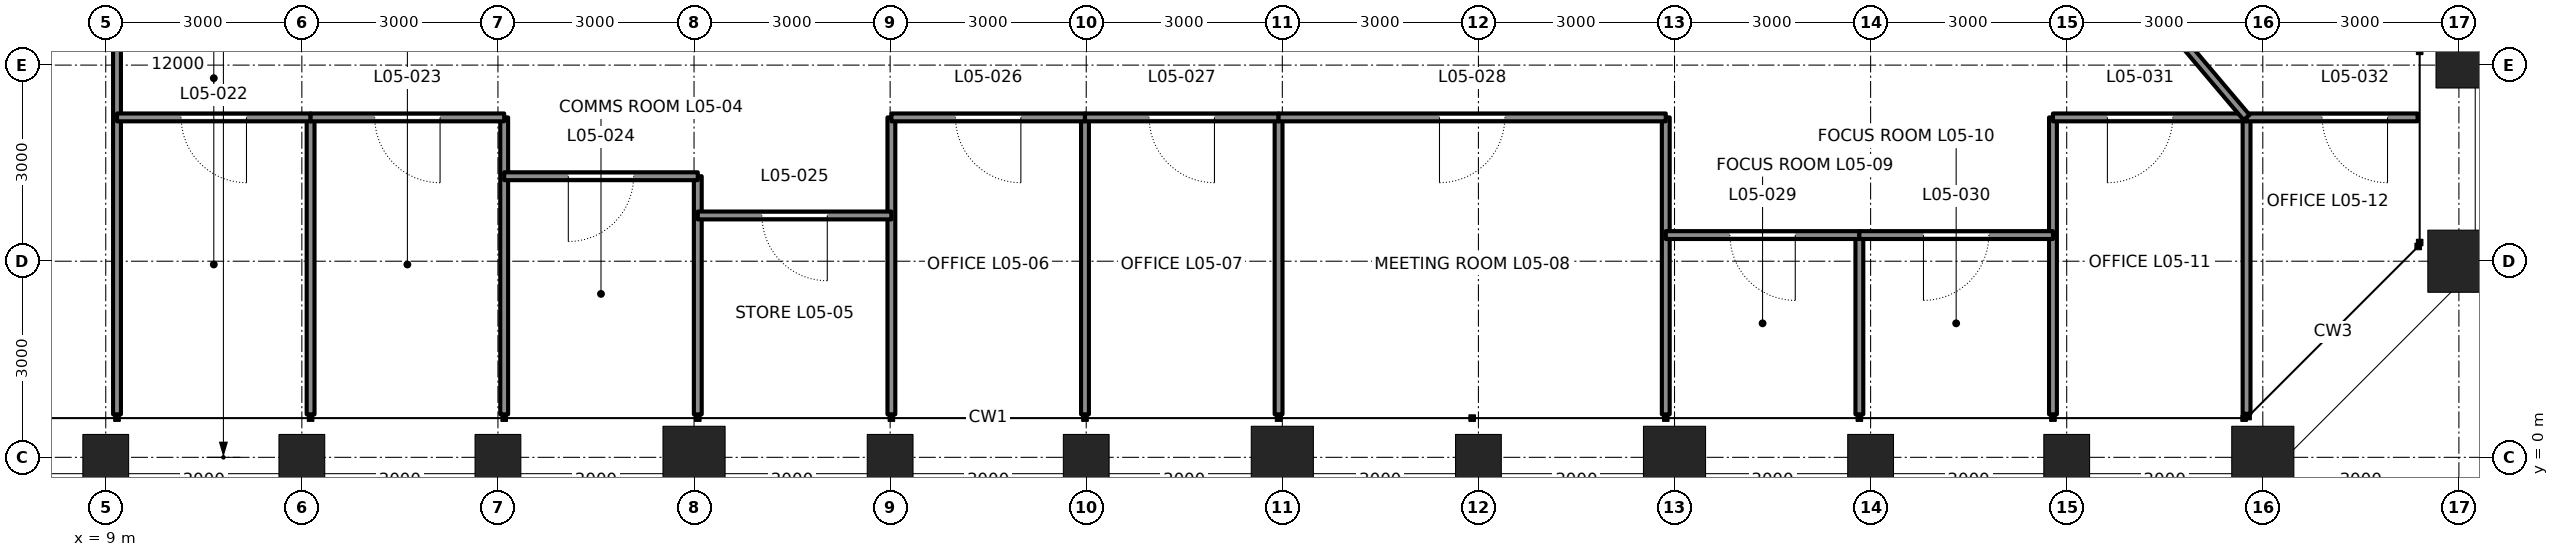
"""IFC4 building model, lengths in metres.
Left out: names, types, materials, properties, quantities, classifications, styles, units other than length and angle.
Written with IfcOpenShell. Run it as: python <this file> out.ifc"""

import sys

from ifc_helpers import new_model, si_unit, direction, frame, frame_2d, origin, origin_2d, place, context, subcontext, project, spatial, rectangle, hollow_rectangle, extrude, element, fill, save


model = new_model("IFC4")
c1 = context("Model", 3, precision=1e-05, world=origin(), true_north=direction((0.0, 1.0)))
c2 = subcontext(c1, "Body", "Model", "MODEL_VIEW")
j1 = project(units=[si_unit("LENGTHUNIT", "METRE"), si_unit("PLANEANGLEUNIT", "RADIAN")], contexts=[c1])
p1 = place(None, origin())
s1 = spatial("IfcSite", under=j1, at=p1, CompositionType="ELEMENT")
p2 = place(p1, origin())
s2 = spatial("IfcBuilding", under=s1, at=p2, CompositionType="ELEMENT")
p3 = place(p2, frame((0.0, 0.0, 28.8)))
s3 = spatial("IfcBuildingStorey", under=s2, at=p3, CompositionType="ELEMENT", Elevation=28.8)
for number, where, z_axis, x_axis in (
    (1, (9.0, 0.0, 0.0), (0.0, 0.0, 1.0), (0.0, -1.0, 0.0)),
    (2, (12.0, 0.0, 0.0), (0.0, 0.0, 1.0), (0.0, -1.0, 0.0)),
    (3, (15.0, 0.0, 0.0), (0.0, 0.0, 1.0), (0.0, -1.0, 0.0)),
):
    element("IfcColumn", number, at=place(p3, frame(where, z_axis=z_axis, x_axis=x_axis)), inside=s3, PredefinedType="COLUMN", context=c2, shape_type="SweptSolid", body=[
        extrude(hollow_rectangle(XDim=0.7, YDim=0.7, WallThickness=0.07, at=origin_2d()), origin(), (0.0, 0.0, 1.0), 4.5),
    ])
p4 = place(p3, frame((18.0, 0.0, 0.0), z_axis=(0.0, 0.0, 1.0), x_axis=(0.0, -1.0, 0.0)))
e4 = element("IfcColumn", 4, at=p4, inside=s3, PredefinedType="COLUMN", context=c2, shape_type="SweptSolid", body=[
    extrude(hollow_rectangle(XDim=0.95, YDim=0.95, WallThickness=0.11, at=origin_2d()), origin(), (0.0, 0.0, 1.0), 4.5),
])
for number, where, z_axis, x_axis in (
    (5, (21.0, 0.0, 0.0), (0.0, 0.0, 1.0), (0.0, -1.0, 0.0)),
    (6, (24.0, 0.0, 0.0), (0.0, 0.0, 1.0), (0.0, -1.0, 0.0)),
):
    element("IfcColumn", number, at=place(p3, frame(where, z_axis=z_axis, x_axis=x_axis)), inside=s3, PredefinedType="COLUMN", context=c2, shape_type="SweptSolid", body=[
        extrude(hollow_rectangle(XDim=0.7, YDim=0.7, WallThickness=0.07, at=origin_2d()), origin(), (0.0, 0.0, 1.0), 4.5),
    ])
p5 = place(p3, frame((27.0, 0.0, 0.0), z_axis=(0.0, 0.0, 1.0), x_axis=(0.0, -1.0, 0.0)))
e7 = element("IfcColumn", 7, at=p5, inside=s3, PredefinedType="COLUMN", context=c2, shape_type="SweptSolid", body=[
    extrude(hollow_rectangle(XDim=0.95, YDim=0.95, WallThickness=0.11, at=origin_2d()), origin(), (0.0, 0.0, 1.0), 4.5),
])
p6 = place(p3, frame((30.0, 0.0, 0.0), z_axis=(0.0, 0.0, 1.0), x_axis=(0.0, -1.0, 0.0)))
e8 = element("IfcColumn", 8, at=p6, inside=s3, PredefinedType="COLUMN", context=c2, shape_type="SweptSolid", body=[
    extrude(hollow_rectangle(XDim=0.7, YDim=0.7, WallThickness=0.07, at=origin_2d()), origin(), (0.0, 0.0, 1.0), 4.5),
])
p7 = place(p3, frame((33.0, 0.0, 0.0), z_axis=(0.0, 0.0, 1.0), x_axis=(0.0, -1.0, 0.0)))
e9 = element("IfcColumn", 9, at=p7, inside=s3, PredefinedType="COLUMN", context=c2, shape_type="SweptSolid", body=[
    extrude(hollow_rectangle(XDim=0.95, YDim=0.95, WallThickness=0.11, at=origin_2d()), origin(), (0.0, 0.0, 1.0), 4.5),
])
for number, where, z_axis, x_axis in (
    (10, (36.0, 0.0, 0.0), (0.0, 0.0, 1.0), (0.0, -1.0, 0.0)),
    (11, (39.0, 0.0, 0.0), (0.0, 0.0, 1.0), (0.0, -1.0, 0.0)),
):
    element("IfcColumn", number, at=place(p3, frame(where, z_axis=z_axis, x_axis=x_axis)), inside=s3, PredefinedType="COLUMN", context=c2, shape_type="SweptSolid", body=[
        extrude(hollow_rectangle(XDim=0.7, YDim=0.7, WallThickness=0.07, at=origin_2d()), origin(), (0.0, 0.0, 1.0), 4.5),
    ])
for number, where, z_axis, x_axis in (
    (12, (42.0, 0.0, 0.0), (0.0, 0.0, 1.0), (0.0, -1.0, 0.0)),
    (13, (45.0, 3.0, 0.0), (0.0, 0.0, 1.0), (1.0, 0.0, 0.0)),
):
    element("IfcColumn", number, at=place(p3, frame(where, z_axis=z_axis, x_axis=x_axis)), inside=s3, PredefinedType="COLUMN", context=c2, shape_type="SweptSolid", body=[
        extrude(hollow_rectangle(XDim=0.95, YDim=0.95, WallThickness=0.095, at=origin_2d()), origin(), (0.0, 0.0, 1.0), 4.5),
    ])
p8 = place(p3, frame((45.0, 6.0, 0.0), z_axis=(0.0, 0.0, 1.0), x_axis=(1.0, 0.0, 0.0)))
e14 = element("IfcColumn", 14, at=p8, inside=s3, PredefinedType="COLUMN", context=c2, shape_type="SweptSolid", body=[
    extrude(hollow_rectangle(XDim=0.7, YDim=0.7, WallThickness=0.07, at=origin_2d()), origin(), (0.0, 0.0, 1.0), 4.5),
])
p9 = place(p3, frame((9.172, 0.657, -0.3), z_axis=(0.0, 0.0, 1.0), x_axis=(0.0, 1.0, 0.0)))
e15 = element("IfcWall", 15, at=p9, inside=s3, PredefinedType="PARTITIONING", context=c2, shape_type="SweptSolid", body=[
    extrude(rectangle(XDim=6.042, YDim=0.12, at=frame_2d((3.021, 0.0))), origin(), (0.0, 0.0, 1.0), 4.34),
])
p10 = place(p3, frame((12.134, 0.657, -0.3), z_axis=(0.0, 0.0, 1.0), x_axis=(0.0, 1.0, 0.0)))
e16 = element("IfcWall", 16, at=p10, inside=s3, PredefinedType="PARTITIONING", context=c2, shape_type="SweptSolid", body=[
    extrude(rectangle(XDim=4.542, YDim=0.12, at=frame_2d((2.271, 0.0))), origin(), (0.0, 0.0, 1.0), 3.481),
])
p11 = place(p3, frame((15.096, 0.657, -0.3), z_axis=(0.0, 0.0, 1.0), x_axis=(0.0, 1.0, 0.0)))
e17 = element("IfcWall", 17, at=p11, inside=s3, PredefinedType="PARTITIONING", context=c2, shape_type="SweptSolid", body=[
    extrude(rectangle(XDim=4.542, YDim=0.12, at=frame_2d((2.271, 0.0))), origin(), (0.0, 0.0, 1.0), 3.646),
])
p12 = place(p3, frame((18.057, 0.657, -0.3), z_axis=(0.0, 0.0, 1.0), x_axis=(0.0, 1.0, 0.0)))
e18 = element("IfcWall", 18, at=p12, inside=s3, PredefinedType="PARTITIONING", context=c2, shape_type="SweptSolid", body=[
    extrude(rectangle(XDim=3.643, YDim=0.12, at=frame_2d((1.821, 0.0))), origin(), (0.0, 0.0, 1.0), 3.646),
])
for number, where, z_axis, x_axis in (
    (19, (21.019, 0.657, -0.3), (0.0, 0.0, 1.0), (0.0, 1.0, 0.0)),
    (20, (23.981, 0.657, -0.3), (0.0, 0.0, 1.0), (0.0, 1.0, 0.0)),
    (21, (26.943, 0.657, -0.3), (0.0, 0.0, 1.0), (0.0, 1.0, 0.0)),
):
    element("IfcWall", number, at=place(p3, frame(where, z_axis=z_axis, x_axis=x_axis)), inside=s3, PredefinedType="PARTITIONING", context=c2, shape_type="SweptSolid", body=[
        extrude(rectangle(XDim=4.542, YDim=0.12, at=frame_2d((2.271, 0.0))), origin(), (0.0, 0.0, 1.0), 3.646),
    ])
p13 = place(p3, frame((32.866, 0.657, -0.3), z_axis=(0.0, 0.0, 1.0), x_axis=(0.0, 1.0, 0.0)))
e22 = element("IfcWall", 22, at=p13, inside=s3, PredefinedType="PARTITIONING", context=c2, shape_type="SweptSolid", body=[
    extrude(rectangle(XDim=4.542, YDim=0.12, at=frame_2d((2.271, 0.0))), origin(), (0.0, 0.0, 1.0), 3.481),
])
p14 = place(p3, frame((35.828, 0.657, -0.3), z_axis=(0.0, 0.0, 1.0), x_axis=(0.0, 1.0, 0.0)))
e23 = element("IfcWall", 23, at=p14, inside=s3, PredefinedType="PARTITIONING", context=c2, shape_type="SweptSolid", body=[
    extrude(rectangle(XDim=2.742, YDim=0.12, at=frame_2d((1.371, 0.0))), origin(), (0.0, 0.0, 1.0), 4.34),
])
p15 = place(p3, frame((38.79, 0.657, -0.3), z_axis=(0.0, 0.0, 1.0), x_axis=(0.0, 1.0, 0.0)))
e24 = element("IfcWall", 24, at=p15, inside=s3, PredefinedType="PARTITIONING", context=c2, shape_type="SweptSolid", body=[
    extrude(rectangle(XDim=4.542, YDim=0.12, at=frame_2d((2.271, 0.0))), origin(), (0.0, 0.0, 1.0), 4.34),
])
p16 = place(p3, frame((41.751, 0.666, -0.3), z_axis=(0.0, 0.0, 1.0), x_axis=(0.0, 1.0, 0.0)))
e25 = element("IfcWall", 25, at=p16, inside=s3, PredefinedType="PARTITIONING", context=c2, shape_type="SweptSolid", body=[
    extrude(rectangle(XDim=4.534, YDim=0.12, at=frame_2d((2.267, 0.0))), origin(), (0.0, 0.0, 1.0), 4.34),
])
p17 = place(p3, frame((9.172, 5.2, -0.3), z_axis=(0.0, 0.0, 1.0), x_axis=(1.0, 0.0, 0.0)))
e26 = element("IfcWall", 26, at=p17, inside=s3, PredefinedType="PARTITIONING", context=c2, shape_type="SweptSolid", body=[
    extrude(rectangle(XDim=2.962, YDim=0.12, at=frame_2d((1.481, 0.0))), origin(), (0.0, 0.0, 1.0), 4.34),
])
p18 = place(p17, frame((0.981, 0.0, 0.3)))
e27 = element("IfcOpeningElement", 27, at=p18, cuts=e26, PredefinedType="OPENING", context=c2, shape_type="SweptSolid", body=[
    extrude(rectangle(XDim=1.0, YDim=2.4, at=frame_2d((0.5, 1.2))), frame((0.0, 0.07, 0.0), z_axis=(0.0, -1.0, 0.0), x_axis=(1.0, 0.0, 0.0)), (0.0, 0.0, 1.0), 0.14),
])
p19 = place(p3, frame((12.134, 5.2, -0.3), z_axis=(0.0, 0.0, 1.0), x_axis=(1.0, 0.0, 0.0)))
e28 = element("IfcWall", 28, at=p19, inside=s3, PredefinedType="PARTITIONING", context=c2, shape_type="SweptSolid", body=[
    extrude(rectangle(XDim=2.962, YDim=0.12, at=frame_2d((1.481, 0.0))), origin(), (0.0, 0.0, 1.0), 4.34),
])
p20 = place(p19, frame((0.981, 0.0, 0.3)))
e29 = element("IfcOpeningElement", 29, at=p20, cuts=e28, PredefinedType="OPENING", context=c2, shape_type="SweptSolid", body=[
    extrude(rectangle(XDim=1.0, YDim=2.4, at=frame_2d((0.5, 1.2))), frame((0.0, 0.07, 0.0), z_axis=(0.0, -1.0, 0.0), x_axis=(1.0, 0.0, 0.0)), (0.0, 0.0, 1.0), 0.14),
])
p21 = place(p3, frame((15.096, 4.3, -0.3), z_axis=(0.0, 0.0, 1.0), x_axis=(1.0, 0.0, 0.0)))
e30 = element("IfcWall", 30, at=p21, inside=s3, PredefinedType="PARTITIONING", context=c2, shape_type="SweptSolid", body=[
    extrude(rectangle(XDim=2.962, YDim=0.12, at=frame_2d((1.481, 0.0))), origin(), (0.0, 0.0, 1.0), 4.34),
])
p22 = place(p21, frame((0.981, 0.0, 0.3)))
e31 = element("IfcOpeningElement", 31, at=p22, cuts=e30, PredefinedType="OPENING", context=c2, shape_type="SweptSolid", body=[
    extrude(rectangle(XDim=1.0, YDim=2.4, at=frame_2d((0.5, 1.2))), frame((0.0, 0.07, 0.0), z_axis=(0.0, -1.0, 0.0), x_axis=(1.0, 0.0, 0.0)), (0.0, 0.0, 1.0), 0.14),
])
p23 = place(p3, frame((18.057, 3.7, -0.3), z_axis=(0.0, 0.0, 1.0), x_axis=(1.0, 0.0, 0.0)))
e32 = element("IfcWall", 32, at=p23, inside=s3, PredefinedType="PARTITIONING", context=c2, shape_type="SweptSolid", body=[
    extrude(rectangle(XDim=2.962, YDim=0.12, at=frame_2d((1.481, 0.0))), origin(), (0.0, 0.0, 1.0), 4.34),
])
p24 = place(p23, frame((0.981, 0.0, 0.3)))
e33 = element("IfcOpeningElement", 33, at=p24, cuts=e32, PredefinedType="OPENING", context=c2, shape_type="SweptSolid", body=[
    extrude(rectangle(XDim=1.0, YDim=2.4, at=frame_2d((0.5, 1.2))), frame((0.0, 0.07, 0.0), z_axis=(0.0, -1.0, 0.0), x_axis=(1.0, 0.0, 0.0)), (0.0, 0.0, 1.0), 0.14),
])
p25 = place(p3, frame((21.019, 5.2, -0.3), z_axis=(0.0, 0.0, 1.0), x_axis=(1.0, 0.0, 0.0)))
e34 = element("IfcWall", 34, at=p25, inside=s3, PredefinedType="PARTITIONING", context=c2, shape_type="SweptSolid", body=[
    extrude(rectangle(XDim=2.962, YDim=0.12, at=frame_2d((1.481, 0.0))), origin(), (0.0, 0.0, 1.0), 4.34),
])
p26 = place(p25, frame((0.981, 0.0, 0.3)))
e35 = element("IfcOpeningElement", 35, at=p26, cuts=e34, PredefinedType="OPENING", context=c2, shape_type="SweptSolid", body=[
    extrude(rectangle(XDim=1.0, YDim=2.4, at=frame_2d((0.5, 1.2))), frame((0.0, 0.07, 0.0), z_axis=(0.0, -1.0, 0.0), x_axis=(1.0, 0.0, 0.0)), (0.0, 0.0, 1.0), 0.14),
])
p27 = place(p3, frame((23.981, 5.2, -0.3), z_axis=(0.0, 0.0, 1.0), x_axis=(1.0, 0.0, 0.0)))
e36 = element("IfcWall", 36, at=p27, inside=s3, PredefinedType="PARTITIONING", context=c2, shape_type="SweptSolid", body=[
    extrude(rectangle(XDim=2.962, YDim=0.12, at=frame_2d((1.481, 0.0))), origin(), (0.0, 0.0, 1.0), 4.34),
])
p28 = place(p27, frame((0.981, 0.0, 0.3)))
e37 = element("IfcOpeningElement", 37, at=p28, cuts=e36, PredefinedType="OPENING", context=c2, shape_type="SweptSolid", body=[
    extrude(rectangle(XDim=1.0, YDim=2.4, at=frame_2d((0.5, 1.2))), frame((0.0, 0.07, 0.0), z_axis=(0.0, -1.0, 0.0), x_axis=(1.0, 0.0, 0.0)), (0.0, 0.0, 1.0), 0.14),
])
p29 = place(p3, frame((26.943, 5.2, -0.3), z_axis=(0.0, 0.0, 1.0), x_axis=(1.0, 0.0, 0.0)))
e38 = element("IfcWall", 38, at=p29, inside=s3, PredefinedType="PARTITIONING", context=c2, shape_type="SweptSolid", body=[
    extrude(rectangle(XDim=5.924, YDim=0.12, at=frame_2d((2.962, 0.0))), origin(), (0.0, 0.0, 1.0), 4.34),
])
p30 = place(p29, frame((2.462, 0.0, 0.3)))
e39 = element("IfcOpeningElement", 39, at=p30, cuts=e38, PredefinedType="OPENING", context=c2, shape_type="SweptSolid", body=[
    extrude(rectangle(XDim=1.0, YDim=2.4, at=frame_2d((0.5, 1.2))), frame((0.0, 0.07, 0.0), z_axis=(0.0, -1.0, 0.0), x_axis=(1.0, 0.0, 0.0)), (0.0, 0.0, 1.0), 0.14),
])
p31 = place(p3, frame((32.866, 3.4, -0.3), z_axis=(0.0, 0.0, 1.0), x_axis=(1.0, 0.0, 0.0)))
e40 = element("IfcWall", 40, at=p31, inside=s3, PredefinedType="PARTITIONING", context=c2, shape_type="SweptSolid", body=[
    extrude(rectangle(XDim=2.962, YDim=0.12, at=frame_2d((1.481, 0.0))), origin(), (0.0, 0.0, 1.0), 4.34),
])
p32 = place(p31, frame((0.981, 0.0, 0.3)))
e41 = element("IfcOpeningElement", 41, at=p32, cuts=e40, PredefinedType="OPENING", context=c2, shape_type="SweptSolid", body=[
    extrude(rectangle(XDim=1.0, YDim=2.4, at=frame_2d((0.5, 1.2))), frame((0.0, 0.07, 0.0), z_axis=(0.0, -1.0, 0.0), x_axis=(1.0, 0.0, 0.0)), (0.0, 0.0, 1.0), 0.14),
])
p33 = place(p3, frame((35.828, 3.4, -0.3), z_axis=(0.0, 0.0, 1.0), x_axis=(1.0, 0.0, 0.0)))
e42 = element("IfcWall", 42, at=p33, inside=s3, PredefinedType="PARTITIONING", context=c2, shape_type="SweptSolid", body=[
    extrude(rectangle(XDim=2.962, YDim=0.12, at=frame_2d((1.481, 0.0))), origin(), (0.0, 0.0, 1.0), 4.34),
])
p34 = place(p33, frame((0.981, 0.0, 0.3)))
e43 = element("IfcOpeningElement", 43, at=p34, cuts=e42, PredefinedType="OPENING", context=c2, shape_type="SweptSolid", body=[
    extrude(rectangle(XDim=1.0, YDim=2.4, at=frame_2d((0.5, 1.2))), frame((0.0, 0.07, 0.0), z_axis=(0.0, -1.0, 0.0), x_axis=(1.0, 0.0, 0.0)), (0.0, 0.0, 1.0), 0.14),
])
p35 = place(p3, frame((38.79, 5.2, -0.3), z_axis=(0.0, 0.0, 1.0), x_axis=(1.0, 0.0, 0.0)))
e44 = element("IfcWall", 44, at=p35, inside=s3, PredefinedType="PARTITIONING", context=c2, shape_type="SweptSolid", body=[
    extrude(rectangle(XDim=2.962, YDim=0.12, at=frame_2d((1.481, 0.0))), origin(), (0.0, 0.0, 1.0), 4.34),
])
p36 = place(p35, frame((0.833, 0.0, 0.3)))
e45 = element("IfcOpeningElement", 45, at=p36, cuts=e44, PredefinedType="OPENING", context=c2, shape_type="SweptSolid", body=[
    extrude(rectangle(XDim=1.0, YDim=2.4, at=frame_2d((0.5, 1.2))), frame((0.0, 0.07, 0.0), z_axis=(0.0, -1.0, 0.0), x_axis=(1.0, 0.0, 0.0)), (0.0, 0.0, 1.0), 0.14),
])
p37 = place(p3, frame((41.751, 5.2, -0.3), z_axis=(0.0, 0.0, 1.0), x_axis=(1.0, 0.0, 0.0)))
e46 = element("IfcWall", 46, at=p37, inside=s3, PredefinedType="PARTITIONING", context=c2, shape_type="SweptSolid", body=[
    extrude(rectangle(XDim=2.616, YDim=0.12, at=frame_2d((1.308, 0.0))), origin(), (0.0, 0.0, 1.0), 4.34),
])
p38 = place(p37, frame((1.156, 0.0, 0.3)))
e47 = element("IfcOpeningElement", 47, at=p38, cuts=e46, PredefinedType="OPENING", context=c2, shape_type="SweptSolid", body=[
    extrude(rectangle(XDim=1.0, YDim=2.4, at=frame_2d((0.5, 1.2))), frame((0.0, 0.07, 0.0), z_axis=(0.0, -1.0, 0.0), x_axis=(1.0, 0.0, 0.0)), (0.0, 0.0, 1.0), 0.14),
])
p39 = place(p3, frame((36.0, 12.0, -0.3), z_axis=(0.0, 0.0, 1.0), x_axis=(0.645783707661, -0.763520401116, 0.0)))
e48 = element("IfcWall", 48, at=p39, inside=s3, PredefinedType="PARTITIONING", context=c2, shape_type="SweptSolid", body=[
    extrude(rectangle(XDim=8.906, YDim=0.12, at=frame_2d((4.453, 0.0))), origin(), (0.0, 0.0, 1.0), 4.34),
])
p40 = place(p39, frame((1.167, 0.0, 0.3)))
e49 = element("IfcOpeningElement", 49, at=p40, cuts=e48, PredefinedType="OPENING", context=c2, shape_type="SweptSolid", body=[
    extrude(rectangle(XDim=1.0, YDim=2.4, at=frame_2d((0.5, 1.2))), frame((0.0, 0.07, 0.0), z_axis=(0.0, -1.0, 0.0), x_axis=(1.0, 0.0, 0.0)), (0.0, 0.0, 1.0), 0.14),
])
p41 = place(p18, frame((1.0, 0.0, 0.0), z_axis=(0.0, 0.0, 1.0), x_axis=(-1.0, 0.0, 0.0)))
e50 = element("IfcDoor", 50, at=p41, inside=s3, OperationType="SINGLE_SWING_LEFT", PredefinedType="DOOR", context=c2, shape_type="SweptSolid", body=[
    extrude(rectangle(XDim=1.0, YDim=2.4, at=frame_2d((0.5, 1.2))), frame((0.0, 0.025, 0.0), z_axis=(0.0, -1.0, 0.0), x_axis=(1.0, 0.0, 0.0)), (0.0, 0.0, 1.0), 0.05),
])
fill(e27, e50)
p42 = place(p20, frame((1.0, 0.0, 0.0), z_axis=(0.0, 0.0, 1.0), x_axis=(-1.0, 0.0, 0.0)))
e51 = element("IfcDoor", 51, at=p42, inside=s3, OperationType="SINGLE_SWING_LEFT", PredefinedType="DOOR", context=c2, shape_type="SweptSolid", body=[
    extrude(rectangle(XDim=1.0, YDim=2.4, at=frame_2d((0.5, 1.2))), frame((0.0, 0.025, 0.0), z_axis=(0.0, -1.0, 0.0), x_axis=(1.0, 0.0, 0.0)), (0.0, 0.0, 1.0), 0.05),
])
fill(e29, e51)
p43 = place(p22, frame((1.0, 0.0, 0.0), z_axis=(0.0, 0.0, 1.0), x_axis=(-1.0, 0.0, 0.0)))
e52 = element("IfcDoor", 52, at=p43, inside=s3, OperationType="SINGLE_SWING_RIGHT", PredefinedType="DOOR", context=c2, shape_type="SweptSolid", body=[
    extrude(rectangle(XDim=1.0, YDim=2.4, at=frame_2d((0.5, 1.2))), frame((0.0, 0.025, 0.0), z_axis=(0.0, -1.0, 0.0), x_axis=(1.0, 0.0, 0.0)), (0.0, 0.0, 1.0), 0.05),
])
fill(e31, e52)
p44 = place(p24, frame((1.0, 0.0, 0.0), z_axis=(0.0, 0.0, 1.0), x_axis=(-1.0, 0.0, 0.0)))
e53 = element("IfcDoor", 53, at=p44, inside=s3, OperationType="SINGLE_SWING_LEFT", PredefinedType="DOOR", context=c2, shape_type="SweptSolid", body=[
    extrude(rectangle(XDim=1.0, YDim=2.4, at=frame_2d((0.5, 1.2))), frame((0.0, 0.025, 0.0), z_axis=(0.0, -1.0, 0.0), x_axis=(1.0, 0.0, 0.0)), (0.0, 0.0, 1.0), 0.05),
])
fill(e33, e53)
p45 = place(p26, frame((1.0, 0.0, 0.0), z_axis=(0.0, 0.0, 1.0), x_axis=(-1.0, 0.0, 0.0)))
e54 = element("IfcDoor", 54, at=p45, inside=s3, OperationType="SINGLE_SWING_LEFT", PredefinedType="DOOR", context=c2, shape_type="SweptSolid", body=[
    extrude(rectangle(XDim=1.0, YDim=2.4, at=frame_2d((0.5, 1.2))), frame((0.0, 0.025, 0.0), z_axis=(0.0, -1.0, 0.0), x_axis=(1.0, 0.0, 0.0)), (0.0, 0.0, 1.0), 0.05),
])
fill(e35, e54)
p46 = place(p28, frame((1.0, 0.0, 0.0), z_axis=(0.0, 0.0, 1.0), x_axis=(-1.0, 0.0, 0.0)))
e55 = element("IfcDoor", 55, at=p46, inside=s3, OperationType="SINGLE_SWING_LEFT", PredefinedType="DOOR", context=c2, shape_type="SweptSolid", body=[
    extrude(rectangle(XDim=1.0, YDim=2.4, at=frame_2d((0.5, 1.2))), frame((0.0, 0.025, 0.0), z_axis=(0.0, -1.0, 0.0), x_axis=(1.0, 0.0, 0.0)), (0.0, 0.0, 1.0), 0.05),
])
fill(e37, e55)
p47 = place(p30, frame((1.0, 0.0, 0.0), z_axis=(0.0, 0.0, 1.0), x_axis=(-1.0, 0.0, 0.0)))
e56 = element("IfcDoor", 56, at=p47, inside=s3, OperationType="SINGLE_SWING_RIGHT", PredefinedType="DOOR", context=c2, shape_type="SweptSolid", body=[
    extrude(rectangle(XDim=1.0, YDim=2.4, at=frame_2d((0.5, 1.2))), frame((0.0, 0.025, 0.0), z_axis=(0.0, -1.0, 0.0), x_axis=(1.0, 0.0, 0.0)), (0.0, 0.0, 1.0), 0.05),
])
fill(e39, e56)
p48 = place(p32, frame((1.0, 0.0, 0.0), z_axis=(0.0, 0.0, 1.0), x_axis=(-1.0, 0.0, 0.0)))
e57 = element("IfcDoor", 57, at=p48, inside=s3, OperationType="SINGLE_SWING_LEFT", PredefinedType="DOOR", context=c2, shape_type="SweptSolid", body=[
    extrude(rectangle(XDim=1.0, YDim=2.4, at=frame_2d((0.5, 1.2))), frame((0.0, 0.025, 0.0), z_axis=(0.0, -1.0, 0.0), x_axis=(1.0, 0.0, 0.0)), (0.0, 0.0, 1.0), 0.05),
])
fill(e41, e57)
p49 = place(p34, frame((1.0, 0.0, 0.0), z_axis=(0.0, 0.0, 1.0), x_axis=(-1.0, 0.0, 0.0)))
e58 = element("IfcDoor", 58, at=p49, inside=s3, OperationType="SINGLE_SWING_RIGHT", PredefinedType="DOOR", context=c2, shape_type="SweptSolid", body=[
    extrude(rectangle(XDim=1.0, YDim=2.4, at=frame_2d((0.5, 1.2))), frame((0.0, 0.025, 0.0), z_axis=(0.0, -1.0, 0.0), x_axis=(1.0, 0.0, 0.0)), (0.0, 0.0, 1.0), 0.05),
])
fill(e43, e58)
p50 = place(p36, frame((1.0, 0.0, 0.0), z_axis=(0.0, 0.0, 1.0), x_axis=(-1.0, 0.0, 0.0)))
e59 = element("IfcDoor", 59, at=p50, inside=s3, OperationType="SINGLE_SWING_RIGHT", PredefinedType="DOOR", context=c2, shape_type="SweptSolid", body=[
    extrude(rectangle(XDim=1.0, YDim=2.4, at=frame_2d((0.5, 1.2))), frame((0.0, 0.025, 0.0), z_axis=(0.0, -1.0, 0.0), x_axis=(1.0, 0.0, 0.0)), (0.0, 0.0, 1.0), 0.05),
])
fill(e45, e59)
p51 = place(p38, frame((1.0, 0.0, 0.0), z_axis=(0.0, 0.0, 1.0), x_axis=(-1.0, 0.0, 0.0)))
e60 = element("IfcDoor", 60, at=p51, inside=s3, OperationType="SINGLE_SWING_LEFT", PredefinedType="DOOR", context=c2, shape_type="SweptSolid", body=[
    extrude(rectangle(XDim=1.0, YDim=2.4, at=frame_2d((0.5, 1.2))), frame((0.0, 0.025, 0.0), z_axis=(0.0, -1.0, 0.0), x_axis=(1.0, 0.0, 0.0)), (0.0, 0.0, 1.0), 0.05),
])
fill(e47, e60)
save(model, sys.argv[1])
